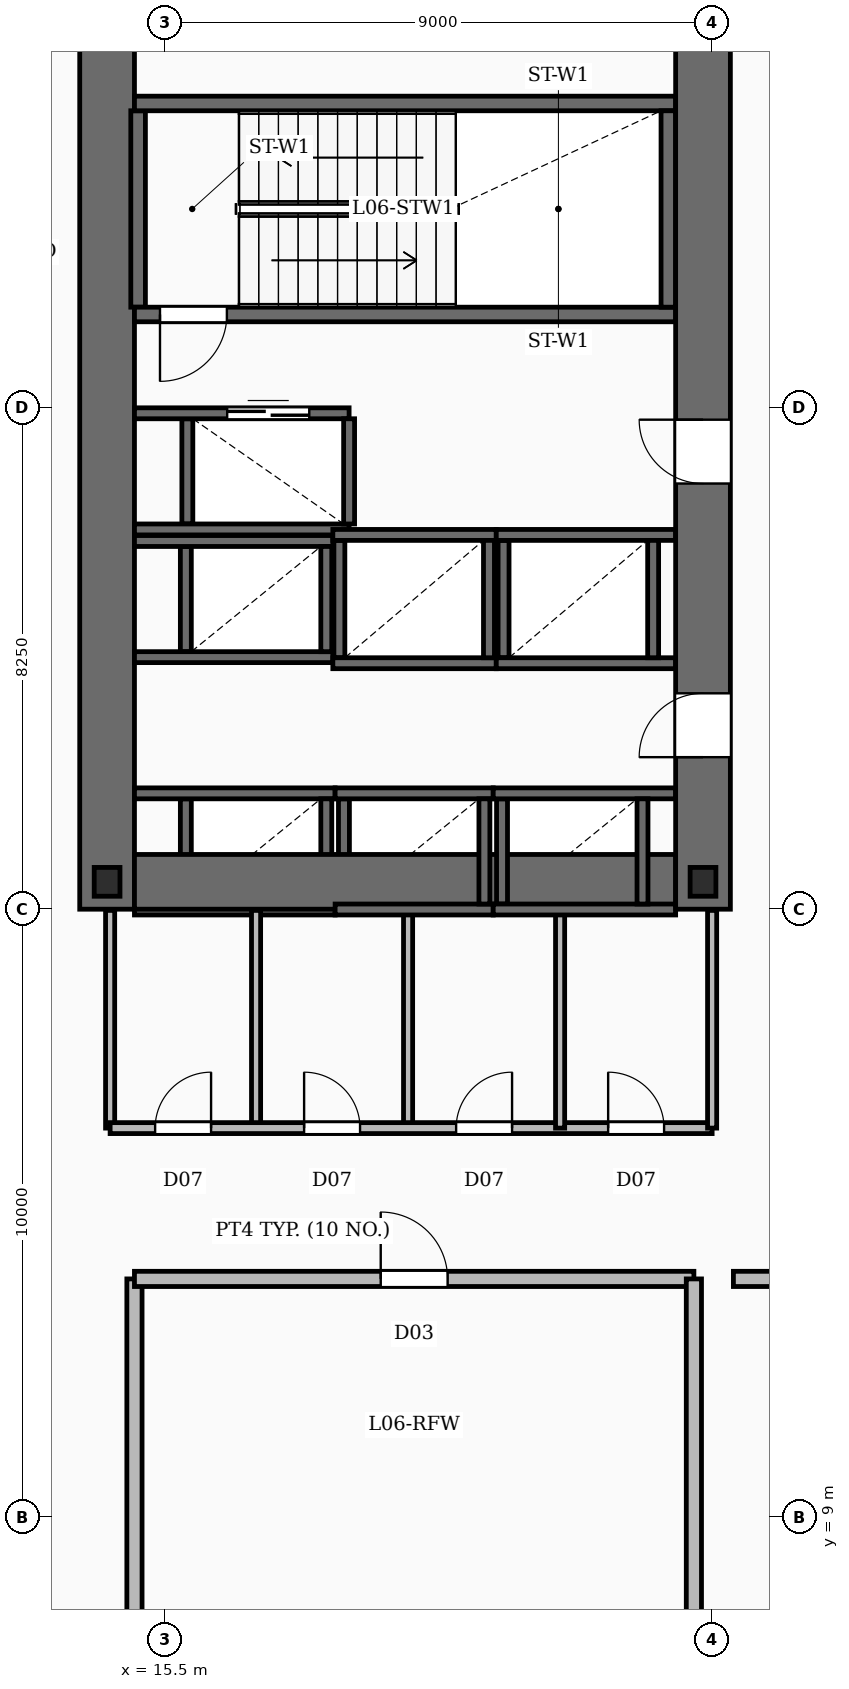
"""IFC4 building model, lengths in metres.
Left out: names, types, materials, properties, quantities, classifications, styles, units other than length and angle.
Written with IfcOpenShell. Run it as: python <this file> out.ifc"""

import sys

from ifc_helpers import new_model, si_unit, direction, frame, frame_2d, origin, origin_2d, place, context, subcontext, project, spatial, rectangle, i_section, extrude, element, fill, save


model = new_model("IFC4")
c1 = context("Model", 3, precision=1e-05, world=origin(), true_north=direction((0.0, 1.0)))
c2 = subcontext(c1, "Body", "Model", "MODEL_VIEW")
j1 = project(units=[si_unit("LENGTHUNIT", "METRE"), si_unit("PLANEANGLEUNIT", "RADIAN")], contexts=[c1])
p1 = place(None, origin())
s1 = spatial("IfcSite", under=j1, at=p1, CompositionType="ELEMENT")
p2 = place(p1, origin())
s2 = spatial("IfcBuilding", under=s1, at=p2, CompositionType="ELEMENT")
p3 = place(p2, frame((0.0, 0.0, 34.0)))
s3 = spatial("IfcBuildingStorey", under=s2, at=p3, CompositionType="ELEMENT", Elevation=34.0)
p4 = place(p3, frame((14.55, 19.0, -0.45), z_axis=(0.0, 0.0, 1.0), x_axis=(0.0, 1.0, 0.0)))
e1 = element("IfcWall", 1, at=p4, inside=s3, PredefinedType="SHEAR", context=c2, shape_type="SweptSolid", body=[
    extrude(rectangle(XDim=15.3, YDim=0.9, at=frame_2d((7.65, 0.0))), origin(), (0.0, 0.0, 1.0), 8.0),
])
p5 = place(p3, frame((24.35, 19.0, -0.45), z_axis=(0.0, 0.0, 1.0), x_axis=(0.0, 1.0, 0.0)))
e2 = element("IfcWall", 2, at=p5, inside=s3, PredefinedType="SHEAR", context=c2, shape_type="SweptSolid", body=[
    extrude(rectangle(XDim=15.3, YDim=0.9, at=frame_2d((7.65, 0.0))), origin(), (0.0, 0.0, 1.0), 8.0),
])
p6 = place(p5, frame((2.5, 0.0, 0.45)))
e3 = element("IfcOpeningElement", 3, at=p6, cuts=e2, PredefinedType="OPENING", context=c2, shape_type="SweptSolid", body=[
    extrude(rectangle(XDim=1.05, YDim=2.15, at=frame_2d((0.525, 1.075))), frame((0.0, 0.46, 0.0), z_axis=(0.0, -1.0, 0.0), x_axis=(1.0, 0.0, 0.0)), (0.0, 0.0, 1.0), 0.92),
])
p7 = place(p5, frame((7.0, 0.0, 0.45)))
e4 = element("IfcOpeningElement", 4, at=p7, cuts=e2, PredefinedType="OPENING", context=c2, shape_type="SweptSolid", body=[
    extrude(rectangle(XDim=1.05, YDim=2.15, at=frame_2d((0.525, 1.075))), frame((0.0, 0.46, 0.0), z_axis=(0.0, -1.0, 0.0), x_axis=(1.0, 0.0, 0.0)), (0.0, 0.0, 1.0), 0.92),
])
p8 = place(p3, frame((15.0, 19.45, -0.45), z_axis=(0.0, 0.0, 1.0), x_axis=(1.0, 0.0, 0.0)))
e5 = element("IfcWall", 5, at=p8, inside=s3, PredefinedType="SHEAR", context=c2, shape_type="SweptSolid", body=[
    extrude(rectangle(XDim=8.9, YDim=0.9, at=frame_2d((4.45, 0.0))), origin(), (0.0, 0.0, 1.0), 8.0),
])
for number, where, z_axis, x_axis in (
    (6, (14.55, 19.45, -0.45), (0.0, 0.0, 1.0), (1.0, 0.0, 0.0)),
    (7, (24.35, 19.45, -0.45), (0.0, 0.0, 1.0), (1.0, 0.0, 0.0)),
):
    element("IfcColumn", number, at=place(p3, frame(where, z_axis=z_axis, x_axis=x_axis)), inside=s3, PredefinedType="COLUMN", context=c2, shape_type="SweptSolid", body=[
        extrude(i_section(OverallWidth=0.424, OverallDepth=0.474, WebThickness=0.048, FlangeThickness=0.077, FilletRadius=0.02, at=origin_2d()), origin(), (0.0, 0.0, 1.0), 8.0),
    ])
p9 = place(p3, frame((23.9, 28.78, 0.0), z_axis=(0.0, 0.0, 1.0), x_axis=(-1.0, 0.0, 0.0)))
e8 = element("IfcWall", 8, at=p9, inside=s3, PredefinedType="SOLIDWALL", context=c2, shape_type="SweptSolid", body=[
    extrude(rectangle(XDim=8.9, YDim=0.24, at=frame_2d((4.45, 0.0))), origin(), (0.0, 0.0, 1.0), 7.55),
])
p10 = place(p9, frame((7.38, 0.0, 0.0)))
e9 = element("IfcOpeningElement", 9, at=p10, cuts=e8, PredefinedType="OPENING", context=c2, shape_type="SweptSolid", body=[
    extrude(rectangle(XDim=1.1, YDim=2.15, at=frame_2d((0.55, 1.075))), frame((0.0, 0.13, 0.0), z_axis=(0.0, -1.0, 0.0), x_axis=(1.0, 0.0, 0.0)), (0.0, 0.0, 1.0), 0.26),
])
p11 = place(p3, frame((15.0, 32.25, 0.0), z_axis=(0.0, 0.0, 1.0), x_axis=(1.0, 0.0, 0.0)))
e10 = element("IfcWall", 10, at=p11, inside=s3, PredefinedType="SOLIDWALL", context=c2, shape_type="SweptSolid", body=[
    extrude(rectangle(XDim=8.9, YDim=0.24, at=frame_2d((4.45, 0.0))), origin(), (0.0, 0.0, 1.0), 7.55),
])
for number, where, z_axis, x_axis in (
    (11, (15.06, 28.9, 0.0), (0.0, 0.0, 1.0), (0.0, 1.0, 0.0)),
    (12, (23.78, 28.9, 0.0), (0.0, 0.0, 1.0), (0.0, 1.0, 0.0)),
):
    element("IfcWall", number, at=place(p3, frame(where, z_axis=z_axis, x_axis=x_axis)), inside=s3, PredefinedType="SOLIDWALL", context=c2, shape_type="SweptSolid", body=[
        extrude(rectangle(XDim=3.23, YDim=0.24, at=frame_2d((1.615, 0.0))), origin(), (0.0, 0.0, 1.0), 7.55),
    ])
for number, where, z_axis, x_axis in (
    (13, (15.0, 20.905, 0.0), (0.0, 0.0, 1.0), (1.0, 0.0, 0.0)),
    (14, (15.0, 18.995, 0.0), (0.0, 0.0, 1.0), (1.0, 0.0, 0.0)),
):
    element("IfcWall", number, at=place(p3, frame(where, z_axis=z_axis, x_axis=x_axis)), inside=s3, PredefinedType="SOLIDWALL", context=c2, shape_type="SweptSolid", body=[
        extrude(rectangle(XDim=3.3, YDim=0.18, at=frame_2d((1.65, 0.0))), origin(), (0.0, 0.0, 1.0), 7.55),
    ])
for number, where, z_axis, x_axis in (
    (15, (15.845, 19.085, 0.0), (0.0, 0.0, 1.0), (0.0, 1.0, 0.0)),
    (16, (18.155, 19.085, 0.0), (0.0, 0.0, 1.0), (0.0, 1.0, 0.0)),
):
    element("IfcWall", number, at=place(p3, frame(where, z_axis=z_axis, x_axis=x_axis)), inside=s3, PredefinedType="SOLIDWALL", context=c2, shape_type="SweptSolid", body=[
        extrude(rectangle(XDim=1.73, YDim=0.18, at=frame_2d((0.865, 0.0))), origin(), (0.0, 0.0, 1.0), 7.55),
    ])
for number, where, z_axis, x_axis in (
    (17, (18.3, 20.905, 0.0), (0.0, 0.0, 1.0), (1.0, 0.0, 0.0)),
    (18, (18.3, 18.995, 0.0), (0.0, 0.0, 1.0), (1.0, 0.0, 0.0)),
):
    element("IfcWall", number, at=place(p3, frame(where, z_axis=z_axis, x_axis=x_axis)), inside=s3, PredefinedType="SOLIDWALL", context=c2, shape_type="SweptSolid", body=[
        extrude(rectangle(XDim=2.6, YDim=0.18, at=frame_2d((1.3, 0.0))), origin(), (0.0, 0.0, 1.0), 7.55),
    ])
for number, where, z_axis, x_axis in (
    (19, (18.445, 19.085, 0.0), (0.0, 0.0, 1.0), (0.0, 1.0, 0.0)),
    (20, (20.755, 19.085, 0.0), (0.0, 0.0, 1.0), (0.0, 1.0, 0.0)),
):
    element("IfcWall", number, at=place(p3, frame(where, z_axis=z_axis, x_axis=x_axis)), inside=s3, PredefinedType="SOLIDWALL", context=c2, shape_type="SweptSolid", body=[
        extrude(rectangle(XDim=1.73, YDim=0.18, at=frame_2d((0.865, 0.0))), origin(), (0.0, 0.0, 1.0), 7.55),
    ])
for number, where, z_axis, x_axis in (
    (21, (20.9, 20.905, 0.0), (0.0, 0.0, 1.0), (1.0, 0.0, 0.0)),
    (22, (20.9, 18.995, 0.0), (0.0, 0.0, 1.0), (1.0, 0.0, 0.0)),
):
    element("IfcWall", number, at=place(p3, frame(where, z_axis=z_axis, x_axis=x_axis)), inside=s3, PredefinedType="SOLIDWALL", context=c2, shape_type="SweptSolid", body=[
        extrude(rectangle(XDim=3.0, YDim=0.18, at=frame_2d((1.5, 0.0))), origin(), (0.0, 0.0, 1.0), 7.55),
    ])
for number, where, z_axis, x_axis in (
    (23, (21.045, 19.085, 0.0), (0.0, 0.0, 1.0), (0.0, 1.0, 0.0)),
    (24, (23.355, 19.085, 0.0), (0.0, 0.0, 1.0), (0.0, 1.0, 0.0)),
):
    element("IfcWall", number, at=place(p3, frame(where, z_axis=z_axis, x_axis=x_axis)), inside=s3, PredefinedType="SOLIDWALL", context=c2, shape_type="SweptSolid", body=[
        extrude(rectangle(XDim=1.73, YDim=0.18, at=frame_2d((0.865, 0.0))), origin(), (0.0, 0.0, 1.0), 7.55),
    ])
for number, where, z_axis, x_axis in (
    (25, (15.0, 25.055, 0.0), (0.0, 0.0, 1.0), (1.0, 0.0, 0.0)),
    (26, (15.0, 23.145, 0.0), (0.0, 0.0, 1.0), (1.0, 0.0, 0.0)),
):
    element("IfcWall", number, at=place(p3, frame(where, z_axis=z_axis, x_axis=x_axis)), inside=s3, PredefinedType="SOLIDWALL", context=c2, shape_type="SweptSolid", body=[
        extrude(rectangle(XDim=3.262, YDim=0.18, at=frame_2d((1.631, 0.0))), origin(), (0.0, 0.0, 1.0), 7.55),
    ])
for number, where, z_axis, x_axis in (
    (27, (15.845, 23.235, 0.0), (0.0, 0.0, 1.0), (0.0, 1.0, 0.0)),
    (28, (18.155, 23.235, 0.0), (0.0, 0.0, 1.0), (0.0, 1.0, 0.0)),
):
    element("IfcWall", number, at=place(p3, frame(where, z_axis=z_axis, x_axis=x_axis)), inside=s3, PredefinedType="SOLIDWALL", context=c2, shape_type="SweptSolid", body=[
        extrude(rectangle(XDim=1.73, YDim=0.18, at=frame_2d((0.865, 0.0))), origin(), (0.0, 0.0, 1.0), 7.55),
    ])
for number, where, z_axis, x_axis in (
    (29, (18.262, 25.155, 0.0), (0.0, 0.0, 1.0), (1.0, 0.0, 0.0)),
    (30, (18.262, 23.045, 0.0), (0.0, 0.0, 1.0), (1.0, 0.0, 0.0)),
):
    element("IfcWall", number, at=place(p3, frame(where, z_axis=z_axis, x_axis=x_axis)), inside=s3, PredefinedType="SOLIDWALL", context=c2, shape_type="SweptSolid", body=[
        extrude(rectangle(XDim=2.688, YDim=0.18, at=frame_2d((1.344, 0.0))), origin(), (0.0, 0.0, 1.0), 7.55),
    ])
for number, where, z_axis, x_axis in (
    (31, (18.37, 23.135, 0.0), (0.0, 0.0, 1.0), (0.0, 1.0, 0.0)),
    (32, (20.83, 23.135, 0.0), (0.0, 0.0, 1.0), (0.0, 1.0, 0.0)),
):
    element("IfcWall", number, at=place(p3, frame(where, z_axis=z_axis, x_axis=x_axis)), inside=s3, PredefinedType="SOLIDWALL", context=c2, shape_type="SweptSolid", body=[
        extrude(rectangle(XDim=1.93, YDim=0.18, at=frame_2d((0.965, 0.0))), origin(), (0.0, 0.0, 1.0), 7.55),
    ])
for number, where, z_axis, x_axis in (
    (33, (20.95, 25.155, 0.0), (0.0, 0.0, 1.0), (1.0, 0.0, 0.0)),
    (34, (20.95, 23.045, 0.0), (0.0, 0.0, 1.0), (1.0, 0.0, 0.0)),
):
    element("IfcWall", number, at=place(p3, frame(where, z_axis=z_axis, x_axis=x_axis)), inside=s3, PredefinedType="SOLIDWALL", context=c2, shape_type="SweptSolid", body=[
        extrude(rectangle(XDim=2.95, YDim=0.18, at=frame_2d((1.475, 0.0))), origin(), (0.0, 0.0, 1.0), 7.55),
    ])
for number, where, z_axis, x_axis in (
    (35, (21.07, 23.135, 0.0), (0.0, 0.0, 1.0), (0.0, 1.0, 0.0)),
    (36, (23.53, 23.135, 0.0), (0.0, 0.0, 1.0), (0.0, 1.0, 0.0)),
):
    element("IfcWall", number, at=place(p3, frame(where, z_axis=z_axis, x_axis=x_axis)), inside=s3, PredefinedType="SOLIDWALL", context=c2, shape_type="SweptSolid", body=[
        extrude(rectangle(XDim=1.93, YDim=0.18, at=frame_2d((0.965, 0.0))), origin(), (0.0, 0.0, 1.0), 7.55),
    ])
p12 = place(p3, frame((15.0, 27.155, 0.0), z_axis=(0.0, 0.0, 1.0), x_axis=(1.0, 0.0, 0.0)))
e37 = element("IfcWall", 37, at=p12, inside=s3, PredefinedType="SOLIDWALL", context=c2, shape_type="SweptSolid", body=[
    extrude(rectangle(XDim=3.53, YDim=0.18, at=frame_2d((1.765, 0.0))), origin(), (0.0, 0.0, 1.0), 7.55),
])
p13 = place(p12, frame((1.525, 0.0, 0.0)))
e38 = element("IfcOpeningElement", 38, at=p13, cuts=e37, PredefinedType="OPENING", context=c2, shape_type="SweptSolid", body=[
    extrude(rectangle(XDim=1.35, YDim=2.3, at=frame_2d((0.675, 1.15))), frame((0.0, 0.1, 0.0), z_axis=(0.0, -1.0, 0.0), x_axis=(1.0, 0.0, 0.0)), (0.0, 0.0, 1.0), 0.2),
])
p14 = place(p3, frame((15.0, 25.245, 0.0), z_axis=(0.0, 0.0, 1.0), x_axis=(1.0, 0.0, 0.0)))
e39 = element("IfcWall", 39, at=p14, inside=s3, PredefinedType="SOLIDWALL", context=c2, shape_type="SweptSolid", body=[
    extrude(rectangle(XDim=3.53, YDim=0.18, at=frame_2d((1.765, 0.0))), origin(), (0.0, 0.0, 1.0), 7.55),
])
for number, where, z_axis, x_axis in (
    (40, (15.87, 25.335, 0.0), (0.0, 0.0, 1.0), (0.0, 1.0, 0.0)),
    (41, (18.53, 25.335, 0.0), (0.0, 0.0, 1.0), (0.0, 1.0, 0.0)),
):
    element("IfcWall", number, at=place(p3, frame(where, z_axis=z_axis, x_axis=x_axis)), inside=s3, PredefinedType="SOLIDWALL", context=c2, shape_type="SweptSolid", body=[
        extrude(rectangle(XDim=1.73, YDim=0.18, at=frame_2d((0.865, 0.0))), origin(), (0.0, 0.0, 1.0), 7.55),
    ])
for number, where, z_axis, x_axis in (
    (42, (17.0, 15.4, 0.0), (0.0, 0.0, 1.0), (0.0, 1.0, 0.0)),
    (43, (19.5, 15.4, 0.0), (0.0, 0.0, 1.0), (0.0, 1.0, 0.0)),
    (44, (22.0, 15.4, 0.0), (0.0, 0.0, 1.0), (0.0, 1.0, 0.0)),
):
    element("IfcWall", number, at=place(p3, frame(where, z_axis=z_axis, x_axis=x_axis)), inside=s3, PredefinedType="PARTITIONING", context=c2, shape_type="SweptSolid", body=[
        extrude(rectangle(XDim=3.58, YDim=0.15, at=frame_2d((1.79, 0.0))), origin(), (0.0, 0.0, 1.0), 6.61),
    ])
p15 = place(p3, frame((14.6, 15.4, 0.0), z_axis=(0.0, 0.0, 1.0), x_axis=(1.0, 0.0, 0.0)))
e45 = element("IfcWall", 45, at=p15, inside=s3, PredefinedType="PARTITIONING", context=c2, shape_type="SweptSolid", body=[
    extrude(rectangle(XDim=9.9, YDim=0.18, at=frame_2d((4.95, 0.0))), origin(), (0.0, 0.0, 1.0), 6.61),
])
p16 = place(p15, frame((0.74, 0.0, 0.0)))
e46 = element("IfcOpeningElement", 46, at=p16, cuts=e45, PredefinedType="OPENING", context=c2, shape_type="SweptSolid", body=[
    extrude(rectangle(XDim=0.92, YDim=2.1, at=frame_2d((0.46, 1.05))), frame((0.0, 0.1, 0.0), z_axis=(0.0, -1.0, 0.0), x_axis=(1.0, 0.0, 0.0)), (0.0, 0.0, 1.0), 0.2),
])
p17 = place(p15, frame((3.19, 0.0, 0.0)))
e47 = element("IfcOpeningElement", 47, at=p17, cuts=e45, PredefinedType="OPENING", context=c2, shape_type="SweptSolid", body=[
    extrude(rectangle(XDim=0.92, YDim=2.1, at=frame_2d((0.46, 1.05))), frame((0.0, 0.1, 0.0), z_axis=(0.0, -1.0, 0.0), x_axis=(1.0, 0.0, 0.0)), (0.0, 0.0, 1.0), 0.2),
])
p18 = place(p15, frame((5.69, 0.0, 0.0)))
e48 = element("IfcOpeningElement", 48, at=p18, cuts=e45, PredefinedType="OPENING", context=c2, shape_type="SweptSolid", body=[
    extrude(rectangle(XDim=0.92, YDim=2.1, at=frame_2d((0.46, 1.05))), frame((0.0, 0.1, 0.0), z_axis=(0.0, -1.0, 0.0), x_axis=(1.0, 0.0, 0.0)), (0.0, 0.0, 1.0), 0.2),
])
p19 = place(p15, frame((8.19, 0.0, 0.0)))
e49 = element("IfcOpeningElement", 49, at=p19, cuts=e45, PredefinedType="OPENING", context=c2, shape_type="SweptSolid", body=[
    extrude(rectangle(XDim=0.92, YDim=2.1, at=frame_2d((0.46, 1.05))), frame((0.0, 0.1, 0.0), z_axis=(0.0, -1.0, 0.0), x_axis=(1.0, 0.0, 0.0)), (0.0, 0.0, 1.0), 0.2),
])
p20 = place(p3, frame((14.6, 15.4, 0.0), z_axis=(0.0, 0.0, 1.0), x_axis=(0.0, 1.0, 0.0)))
e50 = element("IfcWall", 50, at=p20, inside=s3, PredefinedType="PARTITIONING", context=c2, shape_type="SweptSolid", body=[
    extrude(rectangle(XDim=3.58, YDim=0.15, at=frame_2d((1.79, 0.0))), origin(), (0.0, 0.0, 1.0), 6.61),
])
p21 = place(p3, frame((24.5, 15.4, 0.0), z_axis=(0.0, 0.0, 1.0), x_axis=(0.0, 1.0, 0.0)))
e51 = element("IfcWall", 51, at=p21, inside=s3, PredefinedType="PARTITIONING", context=c2, shape_type="SweptSolid", body=[
    extrude(rectangle(XDim=3.58, YDim=0.15, at=frame_2d((1.79, 0.0))), origin(), (0.0, 0.0, 1.0), 5.6),
])
p22 = place(p3, frame((24.85, 12.92, 0.0), z_axis=(0.0, 0.0, 1.0), x_axis=(1.0, 0.0, 0.0)))
e52 = element("IfcWall", 52, at=p22, inside=s3, PredefinedType="SOLIDWALL", context=c2, shape_type="SweptSolid", body=[
    extrude(rectangle(XDim=25.2, YDim=0.25, at=frame_2d((12.6, 0.0))), origin(), (0.0, 0.0, 1.0), 6.61),
])
p23 = place(p22, frame((4.2, 0.0, 0.0)))
e53 = element("IfcOpeningElement", 53, at=p23, cuts=e52, PredefinedType="OPENING", context=c2, shape_type="SweptSolid", body=[
    extrude(rectangle(XDim=1.2, YDim=2.2, at=frame_2d((0.6, 1.1))), frame((0.0, 0.135, 0.0), z_axis=(0.0, -1.0, 0.0), x_axis=(1.0, 0.0, 0.0)), (0.0, 0.0, 1.0), 0.27),
])
p24 = place(p22, frame((17.2, 0.0, 0.0)))
e54 = element("IfcOpeningElement", 54, at=p24, cuts=e52, PredefinedType="OPENING", context=c2, shape_type="SweptSolid", body=[
    extrude(rectangle(XDim=1.2, YDim=2.2, at=frame_2d((0.6, 1.1))), frame((0.0, 0.135, 0.0), z_axis=(0.0, -1.0, 0.0), x_axis=(1.0, 0.0, 0.0)), (0.0, 0.0, 1.0), 0.27),
])
p25 = place(p3, frame((15.0, 12.92, 0.0), z_axis=(0.0, 0.0, 1.0), x_axis=(1.0, 0.0, 0.0)))
e55 = element("IfcWall", 55, at=p25, inside=s3, PredefinedType="SOLIDWALL", context=c2, shape_type="SweptSolid", body=[
    extrude(rectangle(XDim=9.2, YDim=0.25, at=frame_2d((4.6, 0.0))), origin(), (0.0, 0.0, 1.0), 6.61),
])
p26 = place(p25, frame((4.05, 0.0, 0.0)))
e56 = element("IfcOpeningElement", 56, at=p26, cuts=e55, PredefinedType="OPENING", context=c2, shape_type="SweptSolid", body=[
    extrude(rectangle(XDim=1.1, YDim=2.15, at=frame_2d((0.55, 1.075))), frame((0.0, 0.135, 0.0), z_axis=(0.0, -1.0, 0.0), x_axis=(1.0, 0.0, 0.0)), (0.0, 0.0, 1.0), 0.27),
])
for number, where, z_axis, x_axis in (
    (57, (15.0, 3.06, 0.0), (0.0, 0.0, 1.0), (0.0, 1.0, 0.0)),
    (58, (24.2, 3.06, 0.0), (0.0, 0.0, 1.0), (0.0, 1.0, 0.0)),
):
    element("IfcWall", number, at=place(p3, frame(where, z_axis=z_axis, x_axis=x_axis)), inside=s3, PredefinedType="SOLIDWALL", context=c2, shape_type="SweptSolid", body=[
        extrude(rectangle(XDim=9.86, YDim=0.25, at=frame_2d((4.93, 0.0))), origin(), (0.0, 0.0, 1.0), 6.61),
    ])
p27 = place(p6, origin())
e59 = element("IfcDoor", 59, at=p27, inside=s3, OperationType="SINGLE_SWING_LEFT", PredefinedType="DOOR", context=c2, shape_type="SweptSolid", body=[
    extrude(rectangle(XDim=1.05, YDim=2.15, at=frame_2d((0.525, 1.075))), frame((0.0, 0.025, 0.0), z_axis=(0.0, -1.0, 0.0), x_axis=(1.0, 0.0, 0.0)), (0.0, 0.0, 1.0), 0.05),
])
fill(e3, e59)
p28 = place(p7, origin())
e60 = element("IfcDoor", 60, at=p28, inside=s3, OperationType="SINGLE_SWING_RIGHT", PredefinedType="DOOR", context=c2, shape_type="SweptSolid", body=[
    extrude(rectangle(XDim=1.05, YDim=2.15, at=frame_2d((0.525, 1.075))), frame((0.0, 0.025, 0.0), z_axis=(0.0, -1.0, 0.0), x_axis=(1.0, 0.0, 0.0)), (0.0, 0.0, 1.0), 0.05),
])
fill(e4, e60)
p29 = place(p10, origin())
e61 = element("IfcDoor", 61, at=p29, inside=s3, OperationType="SINGLE_SWING_RIGHT", PredefinedType="DOOR", context=c2, shape_type="SweptSolid", body=[
    extrude(rectangle(XDim=1.1, YDim=2.15, at=frame_2d((0.55, 1.075))), frame((0.0, 0.025, 0.0), z_axis=(0.0, -1.0, 0.0), x_axis=(1.0, 0.0, 0.0)), (0.0, 0.0, 1.0), 0.05),
])
fill(e9, e61)
p30 = place(p13, origin())
e62 = element("IfcDoor", 62, at=p30, inside=s3, OperationType="DOUBLE_DOOR_SLIDING", PredefinedType="DOOR", context=c2, shape_type="SweptSolid", body=[
    extrude(rectangle(XDim=1.35, YDim=2.3, at=frame_2d((0.675, 1.15))), frame((0.0, 0.025, 0.0), z_axis=(0.0, -1.0, 0.0), x_axis=(1.0, 0.0, 0.0)), (0.0, 0.0, 1.0), 0.05),
])
fill(e38, e62)
p31 = place(p16, origin())
e63 = element("IfcDoor", 63, at=p31, inside=s3, OperationType="SINGLE_SWING_RIGHT", PredefinedType="DOOR", context=c2, shape_type="SweptSolid", body=[
    extrude(rectangle(XDim=0.92, YDim=2.1, at=frame_2d((0.46, 1.05))), frame((0.0, 0.025, 0.0), z_axis=(0.0, -1.0, 0.0), x_axis=(1.0, 0.0, 0.0)), (0.0, 0.0, 1.0), 0.05),
])
fill(e46, e63)
p32 = place(p17, origin())
e64 = element("IfcDoor", 64, at=p32, inside=s3, OperationType="SINGLE_SWING_LEFT", PredefinedType="DOOR", context=c2, shape_type="SweptSolid", body=[
    extrude(rectangle(XDim=0.92, YDim=2.1, at=frame_2d((0.46, 1.05))), frame((0.0, 0.025, 0.0), z_axis=(0.0, -1.0, 0.0), x_axis=(1.0, 0.0, 0.0)), (0.0, 0.0, 1.0), 0.05),
])
fill(e47, e64)
p33 = place(p18, origin())
e65 = element("IfcDoor", 65, at=p33, inside=s3, OperationType="SINGLE_SWING_RIGHT", PredefinedType="DOOR", context=c2, shape_type="SweptSolid", body=[
    extrude(rectangle(XDim=0.92, YDim=2.1, at=frame_2d((0.46, 1.05))), frame((0.0, 0.025, 0.0), z_axis=(0.0, -1.0, 0.0), x_axis=(1.0, 0.0, 0.0)), (0.0, 0.0, 1.0), 0.05),
])
fill(e48, e65)
p34 = place(p19, origin())
e66 = element("IfcDoor", 66, at=p34, inside=s3, OperationType="SINGLE_SWING_LEFT", PredefinedType="DOOR", context=c2, shape_type="SweptSolid", body=[
    extrude(rectangle(XDim=0.92, YDim=2.1, at=frame_2d((0.46, 1.05))), frame((0.0, 0.025, 0.0), z_axis=(0.0, -1.0, 0.0), x_axis=(1.0, 0.0, 0.0)), (0.0, 0.0, 1.0), 0.05),
])
fill(e49, e66)
p35 = place(p26, origin())
e67 = element("IfcDoor", 67, at=p35, inside=s3, OperationType="SINGLE_SWING_LEFT", PredefinedType="DOOR", context=c2, shape_type="SweptSolid", body=[
    extrude(rectangle(XDim=1.1, YDim=2.15, at=frame_2d((0.55, 1.075))), frame((0.0, 0.025, 0.0), z_axis=(0.0, -1.0, 0.0), x_axis=(1.0, 0.0, 0.0)), (0.0, 0.0, 1.0), 0.05),
])
fill(e56, e67)
save(model, sys.argv[1])
